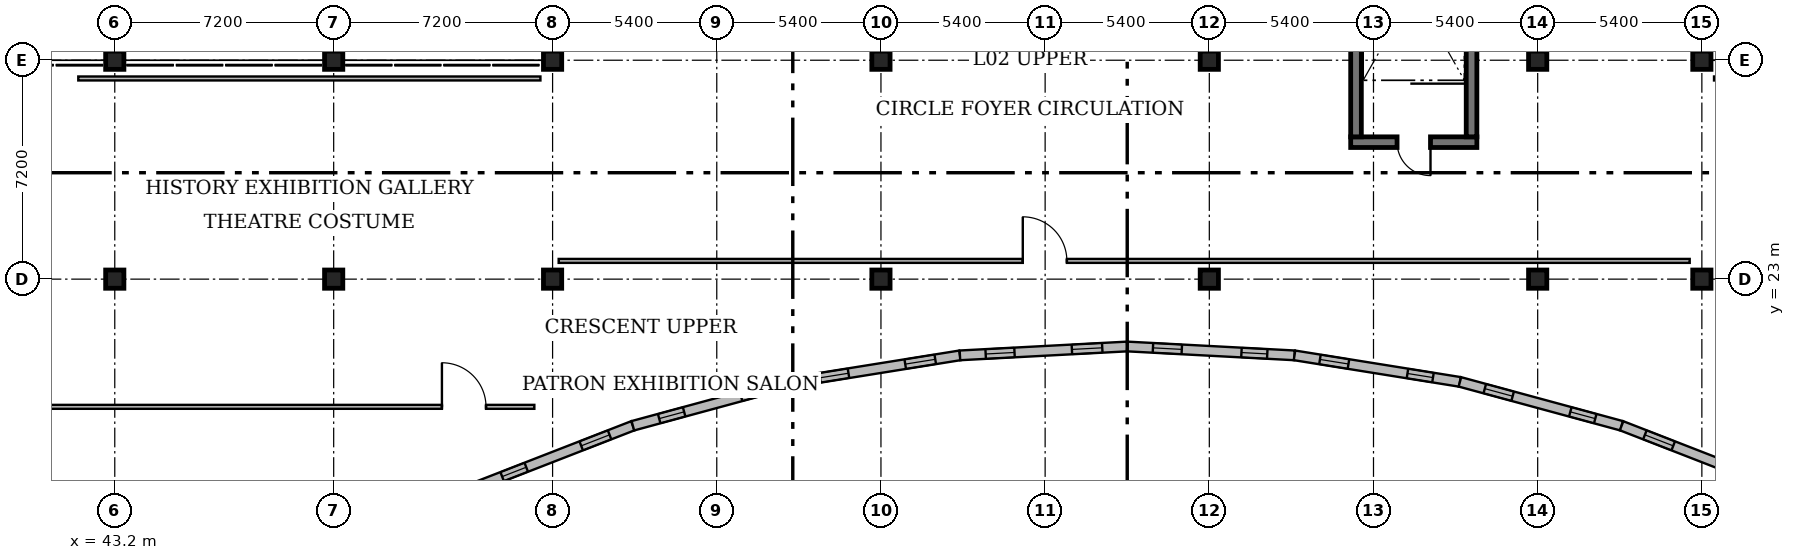
"""IFC4 building model, lengths in metres.
Left out: names, types, materials, properties, quantities, classifications, styles, units other than length and angle.
Written with IfcOpenShell. Run it as: python <this file> out.ifc"""

import sys

from ifc_helpers import new_model, si_unit, direction, frame, frame_2d, origin, origin_2d, place, context, subcontext, project, spatial, rectangle, circle, extrude, element, fill, save


model = new_model("IFC4")
c1 = context("Model", 3, precision=1e-05, world=origin(), true_north=direction((0.0, 1.0)))
c2 = subcontext(c1, "Body", "Model", "MODEL_VIEW")
j1 = project(units=[si_unit("LENGTHUNIT", "METRE"), si_unit("PLANEANGLEUNIT", "RADIAN")], contexts=[c1])
p1 = place(None, origin())
s1 = spatial("IfcSite", under=j1, at=p1, CompositionType="ELEMENT")
p2 = place(p1, origin())
s2 = spatial("IfcBuilding", under=s1, at=p2, CompositionType="ELEMENT")
p3 = place(p2, frame((0.0, 0.0, 9.0)))
s3 = spatial("IfcBuildingStorey", under=s2, at=p3, CompositionType="ELEMENT", Elevation=9.0)
for number, where, z_axis, x_axis in (
    (1, (68.4, 23.0, 0.0), (0.0, 0.0, 1.0), (1.0, 0.0, 0.0)),
    (2, (68.4, 30.2, 0.0), (0.0, 0.0, 1.0), (1.0, 0.0, 0.0)),
    (3, (79.2, 23.0, 0.0), (0.0, 0.0, 1.0), (1.0, 0.0, 0.0)),
    (4, (79.2, 30.2, 0.0), (0.0, 0.0, 1.0), (1.0, 0.0, 0.0)),
    (5, (90.0, 23.0, 0.0), (0.0, 0.0, 1.0), (1.0, 0.0, 0.0)),
    (6, (90.0, 30.2, 0.0), (0.0, 0.0, 1.0), (1.0, 0.0, 0.0)),
    (7, (95.4, 23.0, 0.0), (0.0, 0.0, 1.0), (1.0, 0.0, 0.0)),
    (8, (95.4, 30.2, 0.0), (0.0, 0.0, 1.0), (1.0, 0.0, 0.0)),
    (9, (43.2, 23.0, 0.0), (0.0, 0.0, 1.0), (1.0, 0.0, 0.0)),
    (10, (43.2, 30.2, 0.0), (0.0, 0.0, 1.0), (1.0, 0.0, 0.0)),
    (11, (50.4, 23.0, 0.0), (0.0, 0.0, 1.0), (1.0, 0.0, 0.0)),
    (12, (50.4, 30.2, 0.0), (0.0, 0.0, 1.0), (1.0, 0.0, 0.0)),
    (13, (57.6, 23.0, 0.0), (0.0, 0.0, 1.0), (1.0, 0.0, 0.0)),
    (14, (57.6, 30.2, 0.0), (0.0, 0.0, 1.0), (1.0, 0.0, 0.0)),
):
    element("IfcColumn", number, at=place(p3, frame(where, z_axis=z_axis, x_axis=x_axis)), inside=s3, PredefinedType="COLUMN", context=c2, shape_type="SweptSolid", body=[
        extrude(circle(Radius=0.3, at=origin_2d()), origin(), (0.0, 0.0, 1.0), 4.2),
    ])
p4 = place(p3, frame((88.0, 27.505, 0.0), z_axis=(0.0, 0.0, 1.0), x_axis=(-1.0, 0.0, 0.0)))
e15 = element("IfcWall", 15, at=p4, inside=s3, PredefinedType="SOLIDWALL", context=c2, shape_type="SweptSolid", body=[
    extrude(rectangle(XDim=4.15, YDim=0.35, at=frame_2d((2.075, 0.0))), origin(), (0.0, 0.0, 1.0), 4.5),
])
p5 = place(p4, frame((1.525, 0.0, 0.0)))
e16 = element("IfcOpeningElement", 16, at=p5, cuts=e15, PredefinedType="OPENING", context=c2, shape_type="SweptSolid", body=[
    extrude(rectangle(XDim=1.1, YDim=2.15, at=frame_2d((0.55, 1.075))), frame((0.0, 0.195, 0.0), z_axis=(0.0, -1.0, 0.0), x_axis=(1.0, 0.0, 0.0)), (0.0, 0.0, 1.0), 0.39),
])
for number, where, z_axis, x_axis in (
    (17, (84.025, 27.68, 0.0), (0.0, 0.0, 1.0), (0.0, 1.0, 0.0)),
    (18, (87.825, 35.48, 0.0), (0.0, 0.0, 1.0), (0.0, -1.0, 0.0)),
):
    element("IfcWall", number, at=place(p3, frame(where, z_axis=z_axis, x_axis=x_axis)), inside=s3, PredefinedType="SOLIDWALL", context=c2, shape_type="SweptSolid", body=[
        extrude(rectangle(XDim=7.8, YDim=0.35, at=frame_2d((3.9, 0.0))), origin(), (0.0, 0.0, 1.0), 4.5),
    ])
p6 = place(p3, frame((55.105, 16.18, 0.0), z_axis=(0.0, 0.0, 1.0), x_axis=(0.931946449517, 0.362595939349, 0.0)))
e19 = element("IfcWall", 19, at=p6, inside=s3, PredefinedType="SOLIDWALL", context=c2, shape_type="SweptSolid", body=[
    extrude(rectangle(XDim=5.51, YDim=0.32, at=frame_2d((2.755, 0.0))), origin(), (0.0, 0.0, 1.0), 4.2),
])
p7 = place(p6, frame((0.897, 0.0, 0.78)))
e20 = element("IfcOpeningElement", 20, at=p7, cuts=e19, PredefinedType="OPENING", context=c2, shape_type="SweptSolid", body=[
    extrude(rectangle(XDim=0.85, YDim=2.25, at=frame_2d((0.425, 1.125))), frame((0.0, 0.18, 0.0), z_axis=(0.0, -1.0, 0.0), x_axis=(1.0, 0.0, 0.0)), (0.0, 0.0, 1.0), 0.36),
])
p8 = place(p6, frame((3.688, 0.0, 0.78)))
e21 = element("IfcOpeningElement", 21, at=p8, cuts=e19, PredefinedType="OPENING", context=c2, shape_type="SweptSolid", body=[
    extrude(rectangle(XDim=1.0, YDim=1.95, at=frame_2d((0.5, 0.975))), frame((0.0, 0.18, 0.0), z_axis=(0.0, -1.0, 0.0), x_axis=(1.0, 0.0, 0.0)), (0.0, 0.0, 1.0), 0.36),
])
p9 = place(p3, frame((60.24, 18.177, 0.0), z_axis=(0.0, 0.0, 1.0), x_axis=(0.965092315166, 0.261909952479, 0.0)))
e22 = element("IfcWall", 22, at=p9, inside=s3, PredefinedType="SOLIDWALL", context=c2, shape_type="SweptSolid", body=[
    extrude(rectangle(XDim=5.51, YDim=0.32, at=frame_2d((2.755, 0.0))), origin(), (0.0, 0.0, 1.0), 4.2),
])
p10 = place(p9, frame((0.897, 0.0, 0.927)))
e23 = element("IfcOpeningElement", 23, at=p10, cuts=e22, PredefinedType="OPENING", context=c2, shape_type="SweptSolid", body=[
    extrude(rectangle(XDim=0.85, YDim=2.35, at=frame_2d((0.425, 1.175))), frame((0.0, 0.18, 0.0), z_axis=(0.0, -1.0, 0.0), x_axis=(1.0, 0.0, 0.0)), (0.0, 0.0, 1.0), 0.36),
])
p11 = place(p9, frame((3.688, 0.0, 0.927)))
e24 = element("IfcOpeningElement", 24, at=p11, cuts=e22, PredefinedType="OPENING", context=c2, shape_type="SweptSolid", body=[
    extrude(rectangle(XDim=1.0, YDim=2.05, at=frame_2d((0.5, 1.025))), frame((0.0, 0.18, 0.0), z_axis=(0.0, -1.0, 0.0), x_axis=(1.0, 0.0, 0.0)), (0.0, 0.0, 1.0), 0.36),
])
p12 = place(p3, frame((65.558, 19.621, 0.0), z_axis=(0.0, 0.0, 1.0), x_axis=(0.9873802806, 0.158367236138, 0.0)))
e25 = element("IfcWall", 25, at=p12, inside=s3, PredefinedType="SOLIDWALL", context=c2, shape_type="SweptSolid", body=[
    extrude(rectangle(XDim=5.51, YDim=0.32, at=frame_2d((2.755, 0.0))), origin(), (0.0, 0.0, 1.0), 4.2),
])
p13 = place(p12, frame((0.847, 0.0, 1.046)))
e26 = element("IfcOpeningElement", 26, at=p13, cuts=e25, PredefinedType="OPENING", context=c2, shape_type="SweptSolid", body=[
    extrude(rectangle(XDim=0.95, YDim=1.9, at=frame_2d((0.475, 0.95))), frame((0.0, 0.18, 0.0), z_axis=(0.0, -1.0, 0.0), x_axis=(1.0, 0.0, 0.0)), (0.0, 0.0, 1.0), 0.36),
])
p14 = place(p12, frame((3.688, 0.0, 1.046)))
e27 = element("IfcOpeningElement", 27, at=p14, cuts=e25, PredefinedType="OPENING", context=c2, shape_type="SweptSolid", body=[
    extrude(rectangle(XDim=1.0, YDim=2.15, at=frame_2d((0.5, 1.075))), frame((0.0, 0.18, 0.0), z_axis=(0.0, -1.0, 0.0), x_axis=(1.0, 0.0, 0.0)), (0.0, 0.0, 1.0), 0.36),
])
p15 = place(p3, frame((70.998, 20.493, 0.0), z_axis=(0.0, 0.0, 1.0), x_axis=(0.998597189501, 0.05294953372, 0.0)))
e28 = element("IfcWall", 28, at=p15, inside=s3, PredefinedType="SOLIDWALL", context=c2, shape_type="SweptSolid", body=[
    extrude(rectangle(XDim=5.51, YDim=0.32, at=frame_2d((2.755, 0.0))), origin(), (0.0, 0.0, 1.0), 4.2),
])
p16 = place(p15, frame((0.847, 0.0, 1.112)))
e29 = element("IfcOpeningElement", 29, at=p16, cuts=e28, PredefinedType="OPENING", context=c2, shape_type="SweptSolid", body=[
    extrude(rectangle(XDim=0.95, YDim=2.0, at=frame_2d((0.475, 1.0))), frame((0.0, 0.18, 0.0), z_axis=(0.0, -1.0, 0.0), x_axis=(1.0, 0.0, 0.0)), (0.0, 0.0, 1.0), 0.36),
])
p17 = place(p15, frame((3.688, 0.0, 1.112)))
e30 = element("IfcOpeningElement", 30, at=p17, cuts=e28, PredefinedType="OPENING", context=c2, shape_type="SweptSolid", body=[
    extrude(rectangle(XDim=1.0, YDim=2.25, at=frame_2d((0.5, 1.125))), frame((0.0, 0.18, 0.0), z_axis=(0.0, -1.0, 0.0), x_axis=(1.0, 0.0, 0.0)), (0.0, 0.0, 1.0), 0.36),
])
p18 = place(p3, frame((76.5, 20.785, 0.0), z_axis=(0.0, 0.0, 1.0), x_axis=(0.998597189501, -0.05294953372, 0.0)))
e31 = element("IfcWall", 31, at=p18, inside=s3, PredefinedType="SOLIDWALL", context=c2, shape_type="SweptSolid", body=[
    extrude(rectangle(XDim=5.51, YDim=0.32, at=frame_2d((2.755, 0.0))), origin(), (0.0, 0.0, 1.0), 4.2),
])
p19 = place(p18, frame((0.847, 0.0, 1.112)))
e32 = element("IfcOpeningElement", 32, at=p19, cuts=e31, PredefinedType="OPENING", context=c2, shape_type="SweptSolid", body=[
    extrude(rectangle(XDim=0.95, YDim=2.1, at=frame_2d((0.475, 1.05))), frame((0.0, 0.18, 0.0), z_axis=(0.0, -1.0, 0.0), x_axis=(1.0, 0.0, 0.0)), (0.0, 0.0, 1.0), 0.36),
])
p20 = place(p18, frame((3.762, 0.0, 1.112)))
e33 = element("IfcOpeningElement", 33, at=p20, cuts=e31, PredefinedType="OPENING", context=c2, shape_type="SweptSolid", body=[
    extrude(rectangle(XDim=0.85, YDim=1.95, at=frame_2d((0.425, 0.975))), frame((0.0, 0.18, 0.0), z_axis=(0.0, -1.0, 0.0), x_axis=(1.0, 0.0, 0.0)), (0.0, 0.0, 1.0), 0.36),
])
p21 = place(p3, frame((82.002, 20.493, 0.0), z_axis=(0.0, 0.0, 1.0), x_axis=(0.9873802806, -0.158367236138, 0.0)))
e34 = element("IfcWall", 34, at=p21, inside=s3, PredefinedType="SOLIDWALL", context=c2, shape_type="SweptSolid", body=[
    extrude(rectangle(XDim=5.51, YDim=0.32, at=frame_2d((2.755, 0.0))), origin(), (0.0, 0.0, 1.0), 4.2),
])
p22 = place(p21, frame((0.847, 0.0, 1.046)))
e35 = element("IfcOpeningElement", 35, at=p22, cuts=e34, PredefinedType="OPENING", context=c2, shape_type="SweptSolid", body=[
    extrude(rectangle(XDim=0.95, YDim=2.2, at=frame_2d((0.475, 1.1))), frame((0.0, 0.18, 0.0), z_axis=(0.0, -1.0, 0.0), x_axis=(1.0, 0.0, 0.0)), (0.0, 0.0, 1.0), 0.36),
])
p23 = place(p21, frame((3.762, 0.0, 1.046)))
e36 = element("IfcOpeningElement", 36, at=p23, cuts=e34, PredefinedType="OPENING", context=c2, shape_type="SweptSolid", body=[
    extrude(rectangle(XDim=0.85, YDim=2.05, at=frame_2d((0.425, 1.025))), frame((0.0, 0.18, 0.0), z_axis=(0.0, -1.0, 0.0), x_axis=(1.0, 0.0, 0.0)), (0.0, 0.0, 1.0), 0.36),
])
p24 = place(p3, frame((87.442, 19.621, 0.0), z_axis=(0.0, 0.0, 1.0), x_axis=(0.965092315166, -0.261909952479, 0.0)))
e37 = element("IfcWall", 37, at=p24, inside=s3, PredefinedType="SOLIDWALL", context=c2, shape_type="SweptSolid", body=[
    extrude(rectangle(XDim=5.51, YDim=0.32, at=frame_2d((2.755, 0.0))), origin(), (0.0, 0.0, 1.0), 4.2),
])
p25 = place(p24, frame((0.847, 0.0, 0.927)))
e38 = element("IfcOpeningElement", 38, at=p25, cuts=e37, PredefinedType="OPENING", context=c2, shape_type="SweptSolid", body=[
    extrude(rectangle(XDim=0.95, YDim=2.3, at=frame_2d((0.475, 1.15))), frame((0.0, 0.18, 0.0), z_axis=(0.0, -1.0, 0.0), x_axis=(1.0, 0.0, 0.0)), (0.0, 0.0, 1.0), 0.36),
])
p26 = place(p24, frame((3.762, 0.0, 0.927)))
e39 = element("IfcOpeningElement", 39, at=p26, cuts=e37, PredefinedType="OPENING", context=c2, shape_type="SweptSolid", body=[
    extrude(rectangle(XDim=0.85, YDim=2.15, at=frame_2d((0.425, 1.075))), frame((0.0, 0.18, 0.0), z_axis=(0.0, -1.0, 0.0), x_axis=(1.0, 0.0, 0.0)), (0.0, 0.0, 1.0), 0.36),
])
p27 = place(p3, frame((92.76, 18.177, 0.0), z_axis=(0.0, 0.0, 1.0), x_axis=(0.931946449517, -0.362595939349, 0.0)))
e40 = element("IfcWall", 40, at=p27, inside=s3, PredefinedType="SOLIDWALL", context=c2, shape_type="SweptSolid", body=[
    extrude(rectangle(XDim=5.51, YDim=0.32, at=frame_2d((2.755, 0.0))), origin(), (0.0, 0.0, 1.0), 4.2),
])
p28 = place(p27, frame((0.823, 0.0, 0.78)))
e41 = element("IfcOpeningElement", 41, at=p28, cuts=e40, PredefinedType="OPENING", context=c2, shape_type="SweptSolid", body=[
    extrude(rectangle(XDim=1.0, YDim=1.95, at=frame_2d((0.5, 0.975))), frame((0.0, 0.18, 0.0), z_axis=(0.0, -1.0, 0.0), x_axis=(1.0, 0.0, 0.0)), (0.0, 0.0, 1.0), 0.36),
])
p29 = place(p27, frame((3.762, 0.0, 0.78)))
e42 = element("IfcOpeningElement", 42, at=p29, cuts=e40, PredefinedType="OPENING", context=c2, shape_type="SweptSolid", body=[
    extrude(rectangle(XDim=0.85, YDim=2.25, at=frame_2d((0.425, 1.125))), frame((0.0, 0.18, 0.0), z_axis=(0.0, -1.0, 0.0), x_axis=(1.0, 0.0, 0.0)), (0.0, 0.0, 1.0), 0.36),
])
for number, where, z_axis, x_axis in (
    (43, (42.0, 29.6, 0.0), (0.0, 0.0, 1.0), (1.0, 0.0, 0.0)),
    (44, (95.8, 29.6, 0.0), (0.0, 0.0, 1.0), (1.0, 0.0, 0.0)),
):
    element("IfcWall", number, at=place(p3, frame(where, z_axis=z_axis, x_axis=x_axis)), inside=s3, PredefinedType="PARTITIONING", context=c2, shape_type="SweptSolid", body=[
        extrude(rectangle(XDim=15.2, YDim=0.13, at=frame_2d((7.6, 0.0))), origin(), (0.0, 0.0, 1.0), 3.96),
    ])
p30 = place(p3, frame((57.8, 23.6, 0.0), z_axis=(0.0, 0.0, 1.0), x_axis=(1.0, 0.0, 0.0)))
e45 = element("IfcWall", 45, at=p30, inside=s3, PredefinedType="PARTITIONING", context=c2, shape_type="SweptSolid", body=[
    extrude(rectangle(XDim=37.2, YDim=0.13, at=frame_2d((18.6, 0.0))), origin(), (0.0, 0.0, 1.0), 3.96),
])
p31 = place(p30, frame((15.265, 0.0, 0.0)))
e46 = element("IfcOpeningElement", 46, at=p31, cuts=e45, PredefinedType="OPENING", context=c2, shape_type="SweptSolid", body=[
    extrude(rectangle(XDim=1.45, YDim=2.2, at=frame_2d((0.725, 1.1))), frame((0.0, 0.085, 0.0), z_axis=(0.0, -1.0, 0.0), x_axis=(1.0, 0.0, 0.0)), (0.0, 0.0, 1.0), 0.17),
])
p32 = place(p3, frame((37.0, 18.8, 0.0), z_axis=(0.0, 0.0, 1.0), x_axis=(1.0, 0.0, 0.0)))
e47 = element("IfcWall", 47, at=p32, inside=s3, PredefinedType="PARTITIONING", context=c2, shape_type="SweptSolid", body=[
    extrude(rectangle(XDim=20.0, YDim=0.13, at=frame_2d((10.0, 0.0))), origin(), (0.0, 0.0, 1.0), 3.96),
])
p33 = place(p32, frame((16.96, 0.0, 0.0)))
e48 = element("IfcOpeningElement", 48, at=p33, cuts=e47, PredefinedType="OPENING", context=c2, shape_type="SweptSolid", body=[
    extrude(rectangle(XDim=1.45, YDim=2.2, at=frame_2d((0.725, 1.1))), frame((0.0, 0.085, 0.0), z_axis=(0.0, -1.0, 0.0), x_axis=(1.0, 0.0, 0.0)), (0.0, 0.0, 1.0), 0.17),
])
p34 = place(p5, origin())
e49 = element("IfcDoor", 49, at=p34, inside=s3, OperationType="SINGLE_SWING_LEFT", PredefinedType="DOOR", context=c2, shape_type="SweptSolid", body=[
    extrude(rectangle(XDim=1.1, YDim=2.15, at=frame_2d((0.55, 1.075))), frame((0.0, 0.025, 0.0), z_axis=(0.0, -1.0, 0.0), x_axis=(1.0, 0.0, 0.0)), (0.0, 0.0, 1.0), 0.05),
])
fill(e16, e49)
p35 = place(p7, origin())
e50 = element("IfcWindow", 50, at=p35, inside=s3, PartitioningType="SINGLE_PANEL", PredefinedType="WINDOW", context=c2, shape_type="SweptSolid", body=[
    extrude(rectangle(XDim=0.85, YDim=2.25, at=frame_2d((0.425, 1.125))), frame((0.0, 0.03, 0.0), z_axis=(0.0, -1.0, 0.0), x_axis=(1.0, 0.0, 0.0)), (0.0, 0.0, 1.0), 0.06),
])
fill(e20, e50)
p36 = place(p8, origin())
e51 = element("IfcWindow", 51, at=p36, inside=s3, PartitioningType="SINGLE_PANEL", PredefinedType="WINDOW", context=c2, shape_type="SweptSolid", body=[
    extrude(rectangle(XDim=1.0, YDim=1.95, at=frame_2d((0.5, 0.975))), frame((0.0, 0.03, 0.0), z_axis=(0.0, -1.0, 0.0), x_axis=(1.0, 0.0, 0.0)), (0.0, 0.0, 1.0), 0.06),
])
fill(e21, e51)
p37 = place(p10, origin())
e52 = element("IfcWindow", 52, at=p37, inside=s3, PartitioningType="SINGLE_PANEL", PredefinedType="WINDOW", context=c2, shape_type="SweptSolid", body=[
    extrude(rectangle(XDim=0.85, YDim=2.35, at=frame_2d((0.425, 1.175))), frame((0.0, 0.03, 0.0), z_axis=(0.0, -1.0, 0.0), x_axis=(1.0, 0.0, 0.0)), (0.0, 0.0, 1.0), 0.06),
])
fill(e23, e52)
p38 = place(p11, origin())
e53 = element("IfcWindow", 53, at=p38, inside=s3, PartitioningType="SINGLE_PANEL", PredefinedType="WINDOW", context=c2, shape_type="SweptSolid", body=[
    extrude(rectangle(XDim=1.0, YDim=2.05, at=frame_2d((0.5, 1.025))), frame((0.0, 0.03, 0.0), z_axis=(0.0, -1.0, 0.0), x_axis=(1.0, 0.0, 0.0)), (0.0, 0.0, 1.0), 0.06),
])
fill(e24, e53)
p39 = place(p13, origin())
e54 = element("IfcWindow", 54, at=p39, inside=s3, PartitioningType="SINGLE_PANEL", PredefinedType="WINDOW", context=c2, shape_type="SweptSolid", body=[
    extrude(rectangle(XDim=0.95, YDim=1.9, at=frame_2d((0.475, 0.95))), frame((0.0, 0.03, 0.0), z_axis=(0.0, -1.0, 0.0), x_axis=(1.0, 0.0, 0.0)), (0.0, 0.0, 1.0), 0.06),
])
fill(e26, e54)
p40 = place(p14, origin())
e55 = element("IfcWindow", 55, at=p40, inside=s3, PartitioningType="SINGLE_PANEL", PredefinedType="WINDOW", context=c2, shape_type="SweptSolid", body=[
    extrude(rectangle(XDim=1.0, YDim=2.15, at=frame_2d((0.5, 1.075))), frame((0.0, 0.03, 0.0), z_axis=(0.0, -1.0, 0.0), x_axis=(1.0, 0.0, 0.0)), (0.0, 0.0, 1.0), 0.06),
])
fill(e27, e55)
p41 = place(p16, origin())
e56 = element("IfcWindow", 56, at=p41, inside=s3, PartitioningType="SINGLE_PANEL", PredefinedType="WINDOW", context=c2, shape_type="SweptSolid", body=[
    extrude(rectangle(XDim=0.95, YDim=2.0, at=frame_2d((0.475, 1.0))), frame((0.0, 0.03, 0.0), z_axis=(0.0, -1.0, 0.0), x_axis=(1.0, 0.0, 0.0)), (0.0, 0.0, 1.0), 0.06),
])
fill(e29, e56)
p42 = place(p17, origin())
e57 = element("IfcWindow", 57, at=p42, inside=s3, PartitioningType="SINGLE_PANEL", PredefinedType="WINDOW", context=c2, shape_type="SweptSolid", body=[
    extrude(rectangle(XDim=1.0, YDim=2.25, at=frame_2d((0.5, 1.125))), frame((0.0, 0.03, 0.0), z_axis=(0.0, -1.0, 0.0), x_axis=(1.0, 0.0, 0.0)), (0.0, 0.0, 1.0), 0.06),
])
fill(e30, e57)
p43 = place(p19, origin())
e58 = element("IfcWindow", 58, at=p43, inside=s3, PartitioningType="SINGLE_PANEL", PredefinedType="WINDOW", context=c2, shape_type="SweptSolid", body=[
    extrude(rectangle(XDim=0.95, YDim=2.1, at=frame_2d((0.475, 1.05))), frame((0.0, 0.03, 0.0), z_axis=(0.0, -1.0, 0.0), x_axis=(1.0, 0.0, 0.0)), (0.0, 0.0, 1.0), 0.06),
])
fill(e32, e58)
p44 = place(p20, origin())
e59 = element("IfcWindow", 59, at=p44, inside=s3, PartitioningType="SINGLE_PANEL", PredefinedType="WINDOW", context=c2, shape_type="SweptSolid", body=[
    extrude(rectangle(XDim=0.85, YDim=1.95, at=frame_2d((0.425, 0.975))), frame((0.0, 0.03, 0.0), z_axis=(0.0, -1.0, 0.0), x_axis=(1.0, 0.0, 0.0)), (0.0, 0.0, 1.0), 0.06),
])
fill(e33, e59)
p45 = place(p22, origin())
e60 = element("IfcWindow", 60, at=p45, inside=s3, PartitioningType="SINGLE_PANEL", PredefinedType="WINDOW", context=c2, shape_type="SweptSolid", body=[
    extrude(rectangle(XDim=0.95, YDim=2.2, at=frame_2d((0.475, 1.1))), frame((0.0, 0.03, 0.0), z_axis=(0.0, -1.0, 0.0), x_axis=(1.0, 0.0, 0.0)), (0.0, 0.0, 1.0), 0.06),
])
fill(e35, e60)
p46 = place(p23, origin())
e61 = element("IfcWindow", 61, at=p46, inside=s3, PartitioningType="SINGLE_PANEL", PredefinedType="WINDOW", context=c2, shape_type="SweptSolid", body=[
    extrude(rectangle(XDim=0.85, YDim=2.05, at=frame_2d((0.425, 1.025))), frame((0.0, 0.03, 0.0), z_axis=(0.0, -1.0, 0.0), x_axis=(1.0, 0.0, 0.0)), (0.0, 0.0, 1.0), 0.06),
])
fill(e36, e61)
p47 = place(p25, origin())
e62 = element("IfcWindow", 62, at=p47, inside=s3, PartitioningType="SINGLE_PANEL", PredefinedType="WINDOW", context=c2, shape_type="SweptSolid", body=[
    extrude(rectangle(XDim=0.95, YDim=2.3, at=frame_2d((0.475, 1.15))), frame((0.0, 0.03, 0.0), z_axis=(0.0, -1.0, 0.0), x_axis=(1.0, 0.0, 0.0)), (0.0, 0.0, 1.0), 0.06),
])
fill(e38, e62)
p48 = place(p26, origin())
e63 = element("IfcWindow", 63, at=p48, inside=s3, PartitioningType="SINGLE_PANEL", PredefinedType="WINDOW", context=c2, shape_type="SweptSolid", body=[
    extrude(rectangle(XDim=0.85, YDim=2.15, at=frame_2d((0.425, 1.075))), frame((0.0, 0.03, 0.0), z_axis=(0.0, -1.0, 0.0), x_axis=(1.0, 0.0, 0.0)), (0.0, 0.0, 1.0), 0.06),
])
fill(e39, e63)
p49 = place(p28, origin())
e64 = element("IfcWindow", 64, at=p49, inside=s3, PartitioningType="SINGLE_PANEL", PredefinedType="WINDOW", context=c2, shape_type="SweptSolid", body=[
    extrude(rectangle(XDim=1.0, YDim=1.95, at=frame_2d((0.5, 0.975))), frame((0.0, 0.03, 0.0), z_axis=(0.0, -1.0, 0.0), x_axis=(1.0, 0.0, 0.0)), (0.0, 0.0, 1.0), 0.06),
])
fill(e41, e64)
p50 = place(p31, origin())
e65 = element("IfcDoor", 65, at=p50, inside=s3, OperationType="DOUBLE_DOOR_SINGLE_SWING", PredefinedType="DOOR", context=c2, shape_type="SweptSolid", body=[
    extrude(rectangle(XDim=1.45, YDim=2.2, at=frame_2d((0.725, 1.1))), frame((0.0, 0.025, 0.0), z_axis=(0.0, -1.0, 0.0), x_axis=(1.0, 0.0, 0.0)), (0.0, 0.0, 1.0), 0.05),
])
fill(e46, e65)
p51 = place(p33, origin())
e66 = element("IfcDoor", 66, at=p51, inside=s3, OperationType="DOUBLE_DOOR_SINGLE_SWING", PredefinedType="DOOR", context=c2, shape_type="SweptSolid", body=[
    extrude(rectangle(XDim=1.45, YDim=2.2, at=frame_2d((0.725, 1.1))), frame((0.0, 0.025, 0.0), z_axis=(0.0, -1.0, 0.0), x_axis=(1.0, 0.0, 0.0)), (0.0, 0.0, 1.0), 0.05),
])
fill(e48, e66)
save(model, sys.argv[1])
